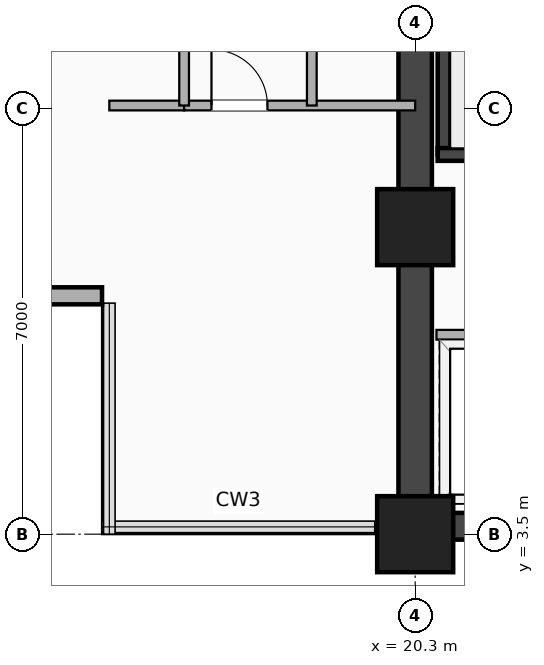
"""IFC4 building model, lengths in metres.
Left out: names, types, materials, properties, quantities, classifications, styles, units other than length and angle.
Written with IfcOpenShell. Run it as: python <this file> out.ifc"""

import sys

from ifc_helpers import new_model, si_unit, direction, frame, frame_2d, origin, origin_2d, place, context, subcontext, project, spatial, rectangle, extrude, element, fill, save


model = new_model("IFC4")
c1 = context("Model", 3, precision=1e-05, world=origin(), true_north=direction((0.0, 1.0)))
c2 = subcontext(c1, "Body", "Model", "MODEL_VIEW")
j1 = project(units=[si_unit("LENGTHUNIT", "METRE"), si_unit("PLANEANGLEUNIT", "RADIAN")], contexts=[c1])
p1 = place(None, origin())
s1 = spatial("IfcSite", under=j1, at=p1, CompositionType="ELEMENT")
p2 = place(p1, origin())
s2 = spatial("IfcBuilding", under=s1, at=p2, CompositionType="ELEMENT")
p3 = place(p2, frame((0.0, 0.0, 83.8)))
s3 = spatial("IfcBuildingStorey", under=s2, at=p3, CompositionType="ELEMENT", Elevation=83.8)
p4 = place(p3, frame((20.3, 3.63, 0.0), z_axis=(0.0, 0.0, 1.0), x_axis=(1.0, 0.0, 0.0)))
e1 = element("IfcWall", 1, at=p4, inside=s3, PredefinedType="SHEAR", context=c2, shape_type="SweptSolid", body=[
    extrude(rectangle(XDim=24.5, YDim=0.44, at=frame_2d((12.25, 0.0))), origin(), (0.0, 0.0, 1.0), 4.14),
])
p5 = place(p3, frame((20.3, 3.5, 0.0), z_axis=(0.0, 0.0, 1.0), x_axis=(0.0, 1.0, 0.0)))
e2 = element("IfcWall", 2, at=p5, inside=s3, PredefinedType="SHEAR", context=c2, shape_type="SweptSolid", body=[
    extrude(rectangle(XDim=16.9, YDim=0.55, at=frame_2d((8.45, 0.0))), origin(), (0.0, 0.0, 1.0), 4.14),
])
p6 = place(p3, frame((20.775, 9.745, 0.0), z_axis=(0.0, 0.0, 1.0), x_axis=(0.0, 1.0, 0.0)))
e3 = element("IfcWall", 3, at=p6, inside=s3, PredefinedType="SHEAR", context=c2, shape_type="SweptSolid", body=[
    extrude(rectangle(XDim=8.01, YDim=0.21, at=frame_2d((4.005, 0.0))), origin(), (0.0, 0.0, 1.0), 4.14),
])
p7 = place(p3, frame((20.67, 9.745, 0.0), z_axis=(0.0, 0.0, 1.0), x_axis=(1.0, 0.0, 0.0)))
e4 = element("IfcWall", 4, at=p7, inside=s3, PredefinedType="SHEAR", context=c2, shape_type="SweptSolid", body=[
    extrude(rectangle(XDim=3.66, YDim=0.21, at=frame_2d((1.83, 0.0))), origin(), (0.0, 0.0, 1.0), 4.14),
])
for number, where, z_axis, x_axis in (
    (5, (20.3, 3.5, -0.26), (0.0, 0.0, 1.0), (1.0, 0.0, 0.0)),
    (6, (20.3, 8.55, -0.26), (0.0, 0.0, 1.0), (1.0, 0.0, 0.0)),
):
    element("IfcColumn", number, at=place(p3, frame(where, z_axis=z_axis, x_axis=x_axis)), inside=s3, PredefinedType="COLUMN", context=c2, shape_type="SweptSolid", body=[
        extrude(rectangle(XDim=1.25, YDim=1.25, at=origin_2d()), origin(), (0.0, 0.0, 1.0), 4.4),
    ])
p8 = place(p3, frame((11.35, 7.42, 0.0), z_axis=(0.0, 0.0, 1.0), x_axis=(1.0, 0.0, 0.0)))
e7 = element("IfcWall", 7, at=p8, inside=s3, PredefinedType="SOLIDWALL", context=c2, shape_type="SweptSolid", body=[
    extrude(rectangle(XDim=3.8, YDim=0.28, at=frame_2d((1.9, 0.0))), origin(), (0.0, 0.0, 1.0), 4.14),
])
p9 = place(p8, frame((1.025, 0.0, 0.85)))
e8 = element("IfcOpeningElement", 8, at=p9, cuts=e7, PredefinedType="OPENING", context=c2, shape_type="SweptSolid", body=[
    extrude(rectangle(XDim=1.75, YDim=1.65, at=frame_2d((0.875, 0.825))), frame((0.0, 0.15, 0.0), z_axis=(0.0, -1.0, 0.0), x_axis=(1.0, 0.0, 0.0)), (0.0, 0.0, 1.0), 0.3),
])
p10 = place(p3, frame((20.65, 6.78, 0.0), z_axis=(0.0, 0.0, 1.0), x_axis=(1.0, 0.0, 0.0)))
e9 = element("IfcWall", 9, at=p10, inside=s3, PredefinedType="PARTITIONING", context=c2, shape_type="SweptSolid", body=[
    extrude(rectangle(XDim=8.3, YDim=0.16, at=frame_2d((4.15, 0.0))), origin(), (0.0, 0.0, 1.0), 3.213),
])
p11 = place(p10, frame((3.695, 0.0, 0.0)))
e10 = element("IfcOpeningElement", 10, at=p11, cuts=e9, PredefinedType="OPENING", context=c2, shape_type="SweptSolid", body=[
    extrude(rectangle(XDim=1.15, YDim=2.2, at=frame_2d((0.575, 1.1))), frame((0.0, 0.09, 0.0), z_axis=(0.0, -1.0, 0.0), x_axis=(1.0, 0.0, 0.0)), (0.0, 0.0, 1.0), 0.18),
])
p12 = place(p10, frame((5.492, 0.0, 0.0)))
e11 = element("IfcOpeningElement", 11, at=p12, cuts=e9, PredefinedType="OPENING", context=c2, shape_type="SweptSolid", body=[
    extrude(rectangle(XDim=1.15, YDim=2.2, at=frame_2d((0.575, 1.1))), frame((0.0, 0.09, 0.0), z_axis=(0.0, -1.0, 0.0), x_axis=(1.0, 0.0, 0.0)), (0.0, 0.0, 1.0), 0.18),
])
p13 = place(p10, frame((1.059, 0.0, 0.0)))
e12 = element("IfcOpeningElement", 12, at=p13, cuts=e9, PredefinedType="OPENING", context=c2, shape_type="SweptSolid", body=[
    extrude(rectangle(XDim=1.15, YDim=2.2, at=frame_2d((0.575, 1.1))), frame((0.0, 0.09, 0.0), z_axis=(0.0, -1.0, 0.0), x_axis=(1.0, 0.0, 0.0)), (0.0, 0.0, 1.0), 0.18),
])
p14 = place(p3, frame((15.27, 10.55, 0.0), z_axis=(0.0, 0.0, 1.0), x_axis=(1.0, 0.0, 0.0)))
e13 = element("IfcWall", 13, at=p14, inside=s3, PredefinedType="PARTITIONING", context=c2, shape_type="SweptSolid", body=[
    extrude(rectangle(XDim=1.23, YDim=0.16, at=frame_2d((0.615, 0.0))), origin(), (0.0, 0.0, 1.0), 4.14),
])
p15 = place(p3, frame((16.5, 10.55, 0.0), z_axis=(0.0, 0.0, 1.0), x_axis=(1.0, 0.0, 0.0)))
e14 = element("IfcWall", 14, at=p15, inside=s3, PredefinedType="PARTITIONING", context=c2, shape_type="SweptSolid", body=[
    extrude(rectangle(XDim=3.8, YDim=0.16, at=frame_2d((1.9, 0.0))), origin(), (0.0, 0.0, 1.0), 3.213),
])
p16 = place(p15, frame((1.37, 0.0, 0.0), z_axis=(0.0, 0.0, 1.0), x_axis=(-1.0, 0.0, 0.0)))
e15 = element("IfcOpeningElement", 15, at=p16, cuts=e14, PredefinedType="OPENING", context=c2, shape_type="SweptSolid", body=[
    extrude(rectangle(XDim=0.92, YDim=2.08, at=frame_2d((0.46, 1.04))), frame((0.0, 0.09, 0.0), z_axis=(0.0, -1.0, 0.0), x_axis=(1.0, 0.0, 0.0)), (0.0, 0.0, 1.0), 0.18),
])
p17 = place(p3, frame((16.5, 10.55, 0.0), z_axis=(0.0, 0.0, 1.0), x_axis=(0.0, 1.0, 0.0)))
e16 = element("IfcWall", 16, at=p17, inside=s3, PredefinedType="PARTITIONING", context=c2, shape_type="SweptSolid", body=[
    extrude(rectangle(XDim=4.03, YDim=0.16, at=frame_2d((2.015, 0.0))), origin(), (0.0, 0.0, 1.0), 3.822),
])
p18 = place(p17, frame((1.4, 0.0, 0.0)))
e17 = element("IfcOpeningElement", 17, at=p18, cuts=e16, PredefinedType="OPENING", context=c2, shape_type="SweptSolid", body=[
    extrude(rectangle(XDim=0.92, YDim=2.08, at=frame_2d((0.46, 1.04))), frame((0.0, 0.09, 0.0), z_axis=(0.0, -1.0, 0.0), x_axis=(1.0, 0.0, 0.0)), (0.0, 0.0, 1.0), 0.18),
])
p19 = place(p3, frame((18.6, 10.55, 0.0), z_axis=(0.0, 0.0, 1.0), x_axis=(0.0, 1.0, 0.0)))
e18 = element("IfcWall", 18, at=p19, inside=s3, PredefinedType="PARTITIONING", context=c2, shape_type="SweptSolid", body=[
    extrude(rectangle(XDim=9.87, YDim=0.16, at=frame_2d((4.935, 0.0))), origin(), (0.0, 0.0, 1.0), 3.213),
])
p20 = place(p19, frame((5.08, 0.0, 0.0), z_axis=(0.0, 0.0, 1.0), x_axis=(-1.0, 0.0, 0.0)))
e19 = element("IfcOpeningElement", 19, at=p20, cuts=e18, PredefinedType="OPENING", context=c2, shape_type="SweptSolid", body=[
    extrude(rectangle(XDim=0.88, YDim=2.08, at=frame_2d((0.44, 1.04))), frame((0.0, 0.09, 0.0), z_axis=(0.0, -1.0, 0.0), x_axis=(1.0, 0.0, 0.0)), (0.0, 0.0, 1.0), 0.18),
])
p21 = place(p16, origin())
e20 = element("IfcDoor", 20, at=p21, inside=s3, OperationType="SINGLE_SWING_LEFT", PredefinedType="DOOR", context=c2, shape_type="SweptSolid", body=[
    extrude(rectangle(XDim=0.92, YDim=2.08, at=frame_2d((0.46, 1.04))), frame((0.0, 0.025, 0.0), z_axis=(0.0, -1.0, 0.0), x_axis=(1.0, 0.0, 0.0)), (0.0, 0.0, 1.0), 0.05),
])
fill(e15, e20)
save(model, sys.argv[1])
